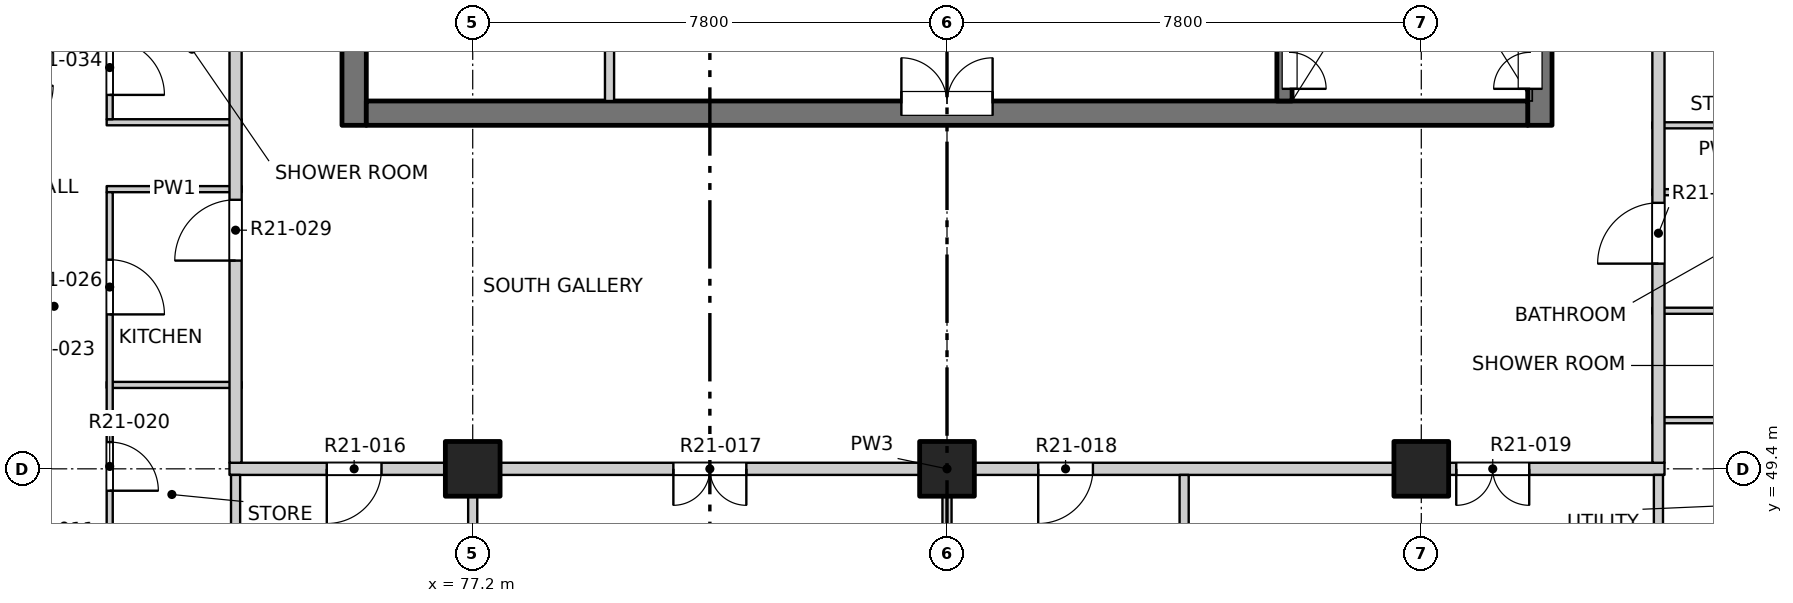
"""IFC4 building model, lengths in metres.
Left out: names, types, materials, properties, quantities, classifications, styles, units other than length and angle.
Written with IfcOpenShell. Run it as: python <this file> out.ifc"""

import sys

from ifc_helpers import new_model, si_unit, direction, frame, frame_2d, origin, origin_2d, place, context, subcontext, project, spatial, rectangle, extrude, element, fill, save


model = new_model("IFC4")
c1 = context("Model", 3, precision=1e-05, world=origin(), true_north=direction((0.0, 1.0)))
c2 = subcontext(c1, "Body", "Model", "MODEL_VIEW")
j1 = project(units=[si_unit("LENGTHUNIT", "METRE"), si_unit("PLANEANGLEUNIT", "RADIAN")], contexts=[c1])
p1 = place(None, origin())
s1 = spatial("IfcSite", under=j1, at=p1, CompositionType="ELEMENT")
p2 = place(p1, origin())
s2 = spatial("IfcBuilding", under=s1, at=p2, CompositionType="ELEMENT")
p3 = place(p2, frame((0.0, 0.0, 221.1)))
s3 = spatial("IfcBuildingStorey", under=s2, at=p3, CompositionType="ELEMENT", Elevation=221.1)
for number, where, z_axis, x_axis in (
    (1, (77.2, 49.4, -0.25), (0.0, 0.0, 1.0), (1.0, 0.0, 0.0)),
    (2, (85.0, 49.4, -0.25), (0.0, 0.0, 1.0), (1.0, 0.0, 0.0)),
    (3, (92.8, 49.4, -0.25), (0.0, 0.0, 1.0), (1.0, 0.0, 0.0)),
):
    element("IfcColumn", number, at=place(p3, frame(where, z_axis=z_axis, x_axis=x_axis)), inside=s3, PredefinedType="COLUMN", context=c2, shape_type="SweptSolid", body=[
        extrude(rectangle(XDim=0.9, YDim=0.9, at=origin_2d()), origin(), (0.0, 0.0, 1.0), 3.4),
    ])
p4 = place(p3, frame((75.25, 55.05, -0.25), z_axis=(0.0, 0.0, 1.0), x_axis=(0.0, 1.0, 0.0)))
e4 = element("IfcWall", 4, at=p4, inside=s3, PredefinedType="SOLIDWALL", context=c2, shape_type="SweptSolid", body=[
    extrude(rectangle(XDim=22.25, YDim=0.4, at=frame_2d((11.125, 0.0))), origin(), (0.0, 0.0, 1.0), 3.4),
])
p5 = place(p4, frame((7.4, 0.0, 0.25)))
e5 = element("IfcOpeningElement", 5, at=p5, cuts=e4, PredefinedType="OPENING", context=c2, shape_type="SweptSolid", body=[
    extrude(rectangle(XDim=0.9, YDim=2.1, at=frame_2d((0.45, 1.05))), frame((0.0, 0.21, 0.0), z_axis=(0.0, -1.0, 0.0), x_axis=(1.0, 0.0, 0.0)), (0.0, 0.0, 1.0), 0.42),
])
p6 = place(p4, frame((13.7, 0.0, 0.25)))
e6 = element("IfcOpeningElement", 6, at=p6, cuts=e4, PredefinedType="OPENING", context=c2, shape_type="SweptSolid", body=[
    extrude(rectangle(XDim=0.9, YDim=2.1, at=frame_2d((0.45, 1.05))), frame((0.0, 0.21, 0.0), z_axis=(0.0, -1.0, 0.0), x_axis=(1.0, 0.0, 0.0)), (0.0, 0.0, 1.0), 0.42),
])
p7 = place(p4, frame((20.0, 0.0, 0.25)))
e7 = element("IfcOpeningElement", 7, at=p7, cuts=e4, PredefinedType="OPENING", context=c2, shape_type="SweptSolid", body=[
    extrude(rectangle(XDim=0.9, YDim=2.1, at=frame_2d((0.45, 1.05))), frame((0.0, 0.21, 0.0), z_axis=(0.0, -1.0, 0.0), x_axis=(1.0, 0.0, 0.0)), (0.0, 0.0, 1.0), 0.42),
])
p8 = place(p3, frame((94.75, 55.05, -0.25), z_axis=(0.0, 0.0, 1.0), x_axis=(0.0, 1.0, 0.0)))
e8 = element("IfcWall", 8, at=p8, inside=s3, PredefinedType="SOLIDWALL", context=c2, shape_type="SweptSolid", body=[
    extrude(rectangle(XDim=6.9, YDim=0.4, at=frame_2d((3.45, 0.0))), origin(), (0.0, 0.0, 1.0), 3.4),
])
p9 = place(p8, frame((0.6, 0.0, 0.25)))
e9 = element("IfcOpeningElement", 9, at=p9, cuts=e8, PredefinedType="OPENING", context=c2, shape_type="SweptSolid", body=[
    extrude(rectangle(XDim=1.2, YDim=2.1, at=frame_2d((0.6, 1.05))), frame((0.0, 0.21, 0.0), z_axis=(0.0, -1.0, 0.0), x_axis=(1.0, 0.0, 0.0)), (0.0, 0.0, 1.0), 0.42),
])
p10 = place(p3, frame((75.45, 55.25, -0.25), z_axis=(0.0, 0.0, 1.0), x_axis=(1.0, 0.0, 0.0)))
e10 = element("IfcWall", 10, at=p10, inside=s3, PredefinedType="SOLIDWALL", context=c2, shape_type="SweptSolid", body=[
    extrude(rectangle(XDim=19.1, YDim=0.4, at=frame_2d((9.55, 0.0))), origin(), (0.0, 0.0, 1.0), 3.4),
])
p11 = place(p10, frame((8.8, 0.0, 0.25)))
e11 = element("IfcOpeningElement", 11, at=p11, cuts=e10, PredefinedType="OPENING", context=c2, shape_type="SweptSolid", body=[
    extrude(rectangle(XDim=1.5, YDim=2.1, at=frame_2d((0.75, 1.05))), frame((0.0, 0.21, 0.0), z_axis=(0.0, -1.0, 0.0), x_axis=(1.0, 0.0, 0.0)), (0.0, 0.0, 1.0), 0.42),
])
p12 = place(p3, frame((90.55, 55.45, -0.25), z_axis=(0.0, 0.0, 1.0), x_axis=(0.0, 1.0, 0.0)))
e12 = element("IfcWall", 12, at=p12, inside=s3, PredefinedType="SOLIDWALL", context=c2, shape_type="SweptSolid", body=[
    extrude(rectangle(XDim=6.5, YDim=0.25, at=frame_2d((3.25, 0.0))), origin(), (0.0, 0.0, 1.0), 3.4),
])
p13 = place(p12, frame((0.2, 0.0, 0.25)))
e13 = element("IfcOpeningElement", 13, at=p13, cuts=e12, PredefinedType="OPENING", context=c2, shape_type="SweptSolid", body=[
    extrude(rectangle(XDim=1.2, YDim=2.1, at=frame_2d((0.6, 1.05))), frame((0.0, 0.135, 0.0), z_axis=(0.0, -1.0, 0.0), x_axis=(1.0, 0.0, 0.0)), (0.0, 0.0, 1.0), 0.27),
])
p14 = place(p3, frame((73.2, 49.4, 0.0), z_axis=(0.0, 0.0, 1.0), x_axis=(1.0, 0.0, 0.0)))
e14 = element("IfcWall", 14, at=p14, inside=s3, PredefinedType="PARTITIONING", context=c2, shape_type="SweptSolid", body=[
    extrude(rectangle(XDim=23.6, YDim=0.2, at=frame_2d((11.8, 0.0))), origin(), (0.0, 0.0, 1.0), 3.15),
])
p15 = place(p14, frame((1.6, 0.0, 0.0)))
e15 = element("IfcOpeningElement", 15, at=p15, cuts=e14, PredefinedType="OPENING", context=c2, shape_type="SweptSolid", body=[
    extrude(rectangle(XDim=0.9, YDim=2.1, at=frame_2d((0.45, 1.05))), frame((0.0, 0.11, 0.0), z_axis=(0.0, -1.0, 0.0), x_axis=(1.0, 0.0, 0.0)), (0.0, 0.0, 1.0), 0.22),
])
p16 = place(p14, frame((7.3, 0.0, 0.0)))
e16 = element("IfcOpeningElement", 16, at=p16, cuts=e14, PredefinedType="OPENING", context=c2, shape_type="SweptSolid", body=[
    extrude(rectangle(XDim=1.2, YDim=2.1, at=frame_2d((0.6, 1.05))), frame((0.0, 0.11, 0.0), z_axis=(0.0, -1.0, 0.0), x_axis=(1.0, 0.0, 0.0)), (0.0, 0.0, 1.0), 0.22),
])
p17 = place(p14, frame((13.3, 0.0, 0.0)))
e17 = element("IfcOpeningElement", 17, at=p17, cuts=e14, PredefinedType="OPENING", context=c2, shape_type="SweptSolid", body=[
    extrude(rectangle(XDim=0.9, YDim=2.1, at=frame_2d((0.45, 1.05))), frame((0.0, 0.11, 0.0), z_axis=(0.0, -1.0, 0.0), x_axis=(1.0, 0.0, 0.0)), (0.0, 0.0, 1.0), 0.22),
])
p18 = place(p14, frame((20.175, 0.0, 0.0)))
e18 = element("IfcOpeningElement", 18, at=p18, cuts=e14, PredefinedType="OPENING", context=c2, shape_type="SweptSolid", body=[
    extrude(rectangle(XDim=1.2, YDim=2.1, at=frame_2d((0.6, 1.05))), frame((0.0, 0.11, 0.0), z_axis=(0.0, -1.0, 0.0), x_axis=(1.0, 0.0, 0.0)), (0.0, 0.0, 1.0), 0.22),
])
for number, where, z_axis, x_axis in (
    (19, (96.6, 50.2, 0.0), (0.0, 0.0, 1.0), (1.0, 0.0, 0.0)),
    (20, (71.18, 50.78, 0.0), (0.0, 0.0, 1.0), (1.0, 0.0, 0.0)),
    (21, (96.6, 52.0, 0.0), (0.0, 0.0, 1.0), (1.0, 0.0, 0.0)),
    (22, (96.6, 53.95, 0.0), (0.0, 0.0, 1.0), (1.0, 0.0, 0.0)),
    (23, (71.18, 54.0, 0.0), (0.0, 0.0, 1.0), (1.0, 0.0, 0.0)),
    (24, (96.6, 55.05, 0.0), (0.0, 0.0, 1.0), (1.0, 0.0, 0.0)),
    (25, (71.18, 55.1, 0.0), (0.0, 0.0, 1.0), (1.0, 0.0, 0.0)),
):
    element("IfcWall", number, at=place(p3, frame(where, z_axis=z_axis, x_axis=x_axis)), inside=s3, PredefinedType="PARTITIONING", context=c2, shape_type="SweptSolid", body=[
        extrude(rectangle(XDim=2.22, YDim=0.1, at=frame_2d((1.11, 0.0))), origin(), (0.0, 0.0, 1.0), 3.15),
    ])
p19 = place(p3, frame((71.23, 45.55, 0.0), z_axis=(0.0, 0.0, 1.0), x_axis=(0.0, 1.0, 0.0)))
e26 = element("IfcWall", 26, at=p19, inside=s3, PredefinedType="PARTITIONING", context=c2, shape_type="SweptSolid", body=[
    extrude(rectangle(XDim=8.4, YDim=0.1, at=frame_2d((4.2, 0.0))), origin(), (0.0, 0.0, 1.0), 3.15),
])
p20 = place(p19, frame((0.85, 0.0, 0.0)))
e27 = element("IfcOpeningElement", 27, at=p20, cuts=e26, PredefinedType="OPENING", context=c2, shape_type="SweptSolid", body=[
    extrude(rectangle(XDim=0.8, YDim=2.1, at=frame_2d((0.4, 1.05))), frame((0.0, 0.06, 0.0), z_axis=(0.0, -1.0, 0.0), x_axis=(1.0, 0.0, 0.0)), (0.0, 0.0, 1.0), 0.12),
])
p21 = place(p19, frame((3.49, 0.0, 0.0)))
e28 = element("IfcOpeningElement", 28, at=p21, cuts=e26, PredefinedType="OPENING", context=c2, shape_type="SweptSolid", body=[
    extrude(rectangle(XDim=0.8, YDim=2.1, at=frame_2d((0.4, 1.05))), frame((0.0, 0.06, 0.0), z_axis=(0.0, -1.0, 0.0), x_axis=(1.0, 0.0, 0.0)), (0.0, 0.0, 1.0), 0.12),
])
p22 = place(p19, frame((6.39, 0.0, 0.0)))
e29 = element("IfcOpeningElement", 29, at=p22, cuts=e26, PredefinedType="OPENING", context=c2, shape_type="SweptSolid", body=[
    extrude(rectangle(XDim=0.9, YDim=2.1, at=frame_2d((0.45, 1.05))), frame((0.0, 0.06, 0.0), z_axis=(0.0, -1.0, 0.0), x_axis=(1.0, 0.0, 0.0)), (0.0, 0.0, 1.0), 0.12),
])
p23 = place(p3, frame((71.23, 55.15, 0.0), z_axis=(0.0, 0.0, 1.0), x_axis=(0.0, 1.0, 0.0)))
e30 = element("IfcWall", 30, at=p23, inside=s3, PredefinedType="PARTITIONING", context=c2, shape_type="SweptSolid", body=[
    extrude(rectangle(XDim=11.9, YDim=0.1, at=frame_2d((5.95, 0.0))), origin(), (0.0, 0.0, 1.0), 3.15),
])
p24 = place(p23, frame((0.4, 0.0, 0.0)))
e31 = element("IfcOpeningElement", 31, at=p24, cuts=e30, PredefinedType="OPENING", context=c2, shape_type="SweptSolid", body=[
    extrude(rectangle(XDim=0.9, YDim=2.1, at=frame_2d((0.45, 1.05))), frame((0.0, 0.06, 0.0), z_axis=(0.0, -1.0, 0.0), x_axis=(1.0, 0.0, 0.0)), (0.0, 0.0, 1.0), 0.12),
])
p25 = place(p23, frame((2.4, 0.0, 0.0)))
e32 = element("IfcOpeningElement", 32, at=p25, cuts=e30, PredefinedType="OPENING", context=c2, shape_type="SweptSolid", body=[
    extrude(rectangle(XDim=0.8, YDim=2.1, at=frame_2d((0.4, 1.05))), frame((0.0, 0.06, 0.0), z_axis=(0.0, -1.0, 0.0), x_axis=(1.0, 0.0, 0.0)), (0.0, 0.0, 1.0), 0.12),
])
p26 = place(p23, frame((4.45, 0.0, 0.0)))
e33 = element("IfcOpeningElement", 33, at=p26, cuts=e30, PredefinedType="OPENING", context=c2, shape_type="SweptSolid", body=[
    extrude(rectangle(XDim=0.9, YDim=2.1, at=frame_2d((0.45, 1.05))), frame((0.0, 0.06, 0.0), z_axis=(0.0, -1.0, 0.0), x_axis=(1.0, 0.0, 0.0)), (0.0, 0.0, 1.0), 0.12),
])
p27 = place(p23, frame((7.2, 0.0, 0.0)))
e34 = element("IfcOpeningElement", 34, at=p27, cuts=e30, PredefinedType="OPENING", context=c2, shape_type="SweptSolid", body=[
    extrude(rectangle(XDim=0.9, YDim=2.1, at=frame_2d((0.45, 1.05))), frame((0.0, 0.06, 0.0), z_axis=(0.0, -1.0, 0.0), x_axis=(1.0, 0.0, 0.0)), (0.0, 0.0, 1.0), 0.12),
])
p28 = place(p23, frame((10.25, 0.0, 0.0)))
e35 = element("IfcOpeningElement", 35, at=p28, cuts=e30, PredefinedType="OPENING", context=c2, shape_type="SweptSolid", body=[
    extrude(rectangle(XDim=0.8, YDim=2.1, at=frame_2d((0.4, 1.05))), frame((0.0, 0.06, 0.0), z_axis=(0.0, -1.0, 0.0), x_axis=(1.0, 0.0, 0.0)), (0.0, 0.0, 1.0), 0.12),
])
p29 = place(p3, frame((73.3, 41.9, 0.0), z_axis=(0.0, 0.0, 1.0), x_axis=(0.0, 1.0, 0.0)))
e36 = element("IfcWall", 36, at=p29, inside=s3, PredefinedType="PARTITIONING", context=c2, shape_type="SweptSolid", body=[
    extrude(rectangle(XDim=7.4, YDim=0.15, at=frame_2d((3.7, 0.0))), origin(), (0.0, 0.0, 1.0), 3.15),
])
p30 = place(p3, frame((73.3, 49.5, 0.0), z_axis=(0.0, 0.0, 1.0), x_axis=(0.0, 1.0, 0.0)))
e37 = element("IfcWall", 37, at=p30, inside=s3, PredefinedType="PARTITIONING", context=c2, shape_type="SweptSolid", body=[
    extrude(rectangle(XDim=34.9, YDim=0.2, at=frame_2d((17.45, 0.0))), origin(), (0.0, 0.0, 1.0), 3.15),
])
p31 = place(p30, frame((3.325, 0.0, 0.0)))
e38 = element("IfcOpeningElement", 38, at=p31, cuts=e37, PredefinedType="OPENING", context=c2, shape_type="SweptSolid", body=[
    extrude(rectangle(XDim=1.0, YDim=2.1, at=frame_2d((0.5, 1.05))), frame((0.0, 0.11, 0.0), z_axis=(0.0, -1.0, 0.0), x_axis=(1.0, 0.0, 0.0)), (0.0, 0.0, 1.0), 0.22),
])
p32 = place(p30, frame((18.875, 0.0, 0.0)))
e39 = element("IfcOpeningElement", 39, at=p32, cuts=e37, PredefinedType="OPENING", context=c2, shape_type="SweptSolid", body=[
    extrude(rectangle(XDim=1.0, YDim=2.1, at=frame_2d((0.5, 1.05))), frame((0.0, 0.11, 0.0), z_axis=(0.0, -1.0, 0.0), x_axis=(1.0, 0.0, 0.0)), (0.0, 0.0, 1.0), 0.22),
])
p33 = place(p30, frame((29.325, 0.0, 0.0)))
e40 = element("IfcOpeningElement", 40, at=p33, cuts=e37, PredefinedType="OPENING", context=c2, shape_type="SweptSolid", body=[
    extrude(rectangle(XDim=1.0, YDim=2.1, at=frame_2d((0.5, 1.05))), frame((0.0, 0.11, 0.0), z_axis=(0.0, -1.0, 0.0), x_axis=(1.0, 0.0, 0.0)), (0.0, 0.0, 1.0), 0.22),
])
p34 = place(p3, frame((77.2, 41.9, 0.0), z_axis=(0.0, 0.0, 1.0), x_axis=(0.0, 1.0, 0.0)))
e41 = element("IfcWall", 41, at=p34, inside=s3, PredefinedType="PARTITIONING", context=c2, shape_type="SweptSolid", body=[
    extrude(rectangle(XDim=7.4, YDim=0.15, at=frame_2d((3.7, 0.0))), origin(), (0.0, 0.0, 1.0), 3.15),
])
p35 = place(p3, frame((79.45, 55.45, 0.0), z_axis=(0.0, 0.0, 1.0), x_axis=(0.0, 1.0, 0.0)))
e42 = element("IfcWall", 42, at=p35, inside=s3, PredefinedType="PARTITIONING", context=c2, shape_type="SweptSolid", body=[
    extrude(rectangle(XDim=5.45, YDim=0.15, at=frame_2d((2.725, 0.0))), origin(), (0.0, 0.0, 1.0), 3.15),
])
p36 = place(p35, frame((2.25, 0.0, 0.0)))
e43 = element("IfcOpeningElement", 43, at=p36, cuts=e42, PredefinedType="OPENING", context=c2, shape_type="SweptSolid", body=[
    extrude(rectangle(XDim=0.9, YDim=2.1, at=frame_2d((0.45, 1.05))), frame((0.0, 0.085, 0.0), z_axis=(0.0, -1.0, 0.0), x_axis=(1.0, 0.0, 0.0)), (0.0, 0.0, 1.0), 0.17),
])
p37 = place(p3, frame((85.0, 41.9, 0.0), z_axis=(0.0, 0.0, 1.0), x_axis=(0.0, 1.0, 0.0)))
e44 = element("IfcWall", 44, at=p37, inside=s3, PredefinedType="PARTITIONING", context=c2, shape_type="SweptSolid", body=[
    extrude(rectangle(XDim=7.4, YDim=0.15, at=frame_2d((3.7, 0.0))), origin(), (0.0, 0.0, 1.0), 3.15),
])
p38 = place(p3, frame((88.9, 41.9, 0.0), z_axis=(0.0, 0.0, 1.0), x_axis=(0.0, 1.0, 0.0)))
e45 = element("IfcWall", 45, at=p38, inside=s3, PredefinedType="PARTITIONING", context=c2, shape_type="SweptSolid", body=[
    extrude(rectangle(XDim=7.4, YDim=0.15, at=frame_2d((3.7, 0.0))), origin(), (0.0, 0.0, 1.0), 2.55),
])
p39 = place(p3, frame((96.7, 41.9, 0.0), z_axis=(0.0, 0.0, 1.0), x_axis=(0.0, 1.0, 0.0)))
e46 = element("IfcWall", 46, at=p39, inside=s3, PredefinedType="PARTITIONING", context=c2, shape_type="SweptSolid", body=[
    extrude(rectangle(XDim=7.4, YDim=0.15, at=frame_2d((3.7, 0.0))), origin(), (0.0, 0.0, 1.0), 3.15),
])
p40 = place(p3, frame((96.7, 49.5, 0.0), z_axis=(0.0, 0.0, 1.0), x_axis=(0.0, 1.0, 0.0)))
e47 = element("IfcWall", 47, at=p40, inside=s3, PredefinedType="PARTITIONING", context=c2, shape_type="SweptSolid", body=[
    extrude(rectangle(XDim=34.9, YDim=0.2, at=frame_2d((17.45, 0.0))), origin(), (0.0, 0.0, 1.0), 3.15),
])
p41 = place(p40, frame((3.275, 0.0, 0.0)))
e48 = element("IfcOpeningElement", 48, at=p41, cuts=e47, PredefinedType="OPENING", context=c2, shape_type="SweptSolid", body=[
    extrude(rectangle(XDim=1.0, YDim=2.1, at=frame_2d((0.5, 1.05))), frame((0.0, 0.11, 0.0), z_axis=(0.0, -1.0, 0.0), x_axis=(1.0, 0.0, 0.0)), (0.0, 0.0, 1.0), 0.22),
])
p42 = place(p40, frame((10.825, 0.0, 0.0)))
e49 = element("IfcOpeningElement", 49, at=p42, cuts=e47, PredefinedType="OPENING", context=c2, shape_type="SweptSolid", body=[
    extrude(rectangle(XDim=1.0, YDim=2.1, at=frame_2d((0.5, 1.05))), frame((0.0, 0.11, 0.0), z_axis=(0.0, -1.0, 0.0), x_axis=(1.0, 0.0, 0.0)), (0.0, 0.0, 1.0), 0.22),
])
p43 = place(p40, frame((21.575, 0.0, 0.0)))
e50 = element("IfcOpeningElement", 50, at=p43, cuts=e47, PredefinedType="OPENING", context=c2, shape_type="SweptSolid", body=[
    extrude(rectangle(XDim=1.0, YDim=2.1, at=frame_2d((0.5, 1.05))), frame((0.0, 0.11, 0.0), z_axis=(0.0, -1.0, 0.0), x_axis=(1.0, 0.0, 0.0)), (0.0, 0.0, 1.0), 0.22),
])
p44 = place(p40, frame((30.575, 0.0, 0.0)))
e51 = element("IfcOpeningElement", 51, at=p44, cuts=e47, PredefinedType="OPENING", context=c2, shape_type="SweptSolid", body=[
    extrude(rectangle(XDim=1.0, YDim=2.1, at=frame_2d((0.5, 1.05))), frame((0.0, 0.11, 0.0), z_axis=(0.0, -1.0, 0.0), x_axis=(1.0, 0.0, 0.0)), (0.0, 0.0, 1.0), 0.22),
])
p45 = place(p15, origin())
e52 = element("IfcDoor", 52, at=p45, inside=s3, OperationType="SINGLE_SWING_RIGHT", PredefinedType="DOOR", context=c2, shape_type="SweptSolid", body=[
    extrude(rectangle(XDim=0.9, YDim=2.1, at=frame_2d((0.45, 1.05))), frame((0.0, 0.025, 0.0), z_axis=(0.0, -1.0, 0.0), x_axis=(1.0, 0.0, 0.0)), (0.0, 0.0, 1.0), 0.05),
])
fill(e15, e52)
p46 = place(p16, origin())
e53 = element("IfcDoor", 53, at=p46, inside=s3, OperationType="DOUBLE_DOOR_SINGLE_SWING", PredefinedType="DOOR", context=c2, shape_type="SweptSolid", body=[
    extrude(rectangle(XDim=1.2, YDim=2.1, at=frame_2d((0.6, 1.05))), frame((0.0, 0.025, 0.0), z_axis=(0.0, -1.0, 0.0), x_axis=(1.0, 0.0, 0.0)), (0.0, 0.0, 1.0), 0.05),
])
fill(e16, e53)
p47 = place(p17, origin())
e54 = element("IfcDoor", 54, at=p47, inside=s3, OperationType="SINGLE_SWING_RIGHT", PredefinedType="DOOR", context=c2, shape_type="SweptSolid", body=[
    extrude(rectangle(XDim=0.9, YDim=2.1, at=frame_2d((0.45, 1.05))), frame((0.0, 0.025, 0.0), z_axis=(0.0, -1.0, 0.0), x_axis=(1.0, 0.0, 0.0)), (0.0, 0.0, 1.0), 0.05),
])
fill(e17, e54)
p48 = place(p18, origin())
e55 = element("IfcDoor", 55, at=p48, inside=s3, OperationType="DOUBLE_DOOR_SINGLE_SWING", PredefinedType="DOOR", context=c2, shape_type="SweptSolid", body=[
    extrude(rectangle(XDim=1.2, YDim=2.1, at=frame_2d((0.6, 1.05))), frame((0.0, 0.025, 0.0), z_axis=(0.0, -1.0, 0.0), x_axis=(1.0, 0.0, 0.0)), (0.0, 0.0, 1.0), 0.05),
])
fill(e18, e55)
p49 = place(p21, origin())
e56 = element("IfcDoor", 56, at=p49, inside=s3, OperationType="SINGLE_SWING_RIGHT", PredefinedType="DOOR", context=c2, shape_type="SweptSolid", body=[
    extrude(rectangle(XDim=0.8, YDim=2.1, at=frame_2d((0.4, 1.05))), frame((0.0, 0.025, 0.0), z_axis=(0.0, -1.0, 0.0), x_axis=(1.0, 0.0, 0.0)), (0.0, 0.0, 1.0), 0.05),
])
fill(e28, e56)
p50 = place(p22, origin())
e57 = element("IfcDoor", 57, at=p50, inside=s3, OperationType="SINGLE_SWING_RIGHT", PredefinedType="DOOR", context=c2, shape_type="SweptSolid", body=[
    extrude(rectangle(XDim=0.9, YDim=2.1, at=frame_2d((0.45, 1.05))), frame((0.0, 0.025, 0.0), z_axis=(0.0, -1.0, 0.0), x_axis=(1.0, 0.0, 0.0)), (0.0, 0.0, 1.0), 0.05),
])
fill(e29, e57)
p51 = place(p41, origin())
e58 = element("IfcDoor", 58, at=p51, inside=s3, OperationType="SINGLE_SWING_RIGHT", PredefinedType="DOOR", context=c2, shape_type="SweptSolid", body=[
    extrude(rectangle(XDim=1.0, YDim=2.1, at=frame_2d((0.5, 1.05))), frame((0.0, 0.025, 0.0), z_axis=(0.0, -1.0, 0.0), x_axis=(1.0, 0.0, 0.0)), (0.0, 0.0, 1.0), 0.05),
])
fill(e48, e58)
p52 = place(p31, origin())
e59 = element("IfcDoor", 59, at=p52, inside=s3, OperationType="SINGLE_SWING_LEFT", PredefinedType="DOOR", context=c2, shape_type="SweptSolid", body=[
    extrude(rectangle(XDim=1.0, YDim=2.1, at=frame_2d((0.5, 1.05))), frame((0.0, 0.025, 0.0), z_axis=(0.0, -1.0, 0.0), x_axis=(1.0, 0.0, 0.0)), (0.0, 0.0, 1.0), 0.05),
])
fill(e38, e59)
p53 = place(p11, origin())
e60 = element("IfcDoor", 60, at=p53, inside=s3, OperationType="DOUBLE_DOOR_SINGLE_SWING", PredefinedType="DOOR", context=c2, shape_type="SweptSolid", body=[
    extrude(rectangle(XDim=1.5, YDim=2.1, at=frame_2d((0.75, 1.05))), frame((0.0, 0.185, 0.0), z_axis=(0.0, -1.0, 0.0), x_axis=(1.0, 0.0, 0.0)), (0.0, 0.0, 1.0), 0.05),
])
fill(e11, e60)
p54 = place(p24, origin())
e61 = element("IfcDoor", 61, at=p54, inside=s3, OperationType="SINGLE_SWING_RIGHT", PredefinedType="DOOR", context=c2, shape_type="SweptSolid", body=[
    extrude(rectangle(XDim=0.9, YDim=2.1, at=frame_2d((0.45, 1.05))), frame((0.0, 0.025, 0.0), z_axis=(0.0, -1.0, 0.0), x_axis=(1.0, 0.0, 0.0)), (0.0, 0.0, 1.0), 0.05),
])
fill(e31, e61)
p55 = place(p13, origin())
e62 = element("IfcDoor", 62, at=p55, inside=s3, OperationType="DOUBLE_DOOR_SINGLE_SWING", PredefinedType="DOOR", context=c2, shape_type="SweptSolid", body=[
    extrude(rectangle(XDim=1.2, YDim=2.1, at=frame_2d((0.6, 1.05))), frame((0.0, -0.06, 0.0), z_axis=(0.0, -1.0, 0.0), x_axis=(1.0, 0.0, 0.0)), (0.0, 0.0, 1.0), 0.05),
])
fill(e13, e62)
p56 = place(p9, origin())
e63 = element("IfcDoor", 63, at=p56, inside=s3, OperationType="DOUBLE_DOOR_SINGLE_SWING", PredefinedType="DOOR", context=c2, shape_type="SweptSolid", body=[
    extrude(rectangle(XDim=1.2, YDim=2.1, at=frame_2d((0.6, 1.05))), frame((0.0, 0.185, 0.0), z_axis=(0.0, -1.0, 0.0), x_axis=(1.0, 0.0, 0.0)), (0.0, 0.0, 1.0), 0.05),
])
fill(e9, e63)
save(model, sys.argv[1])
